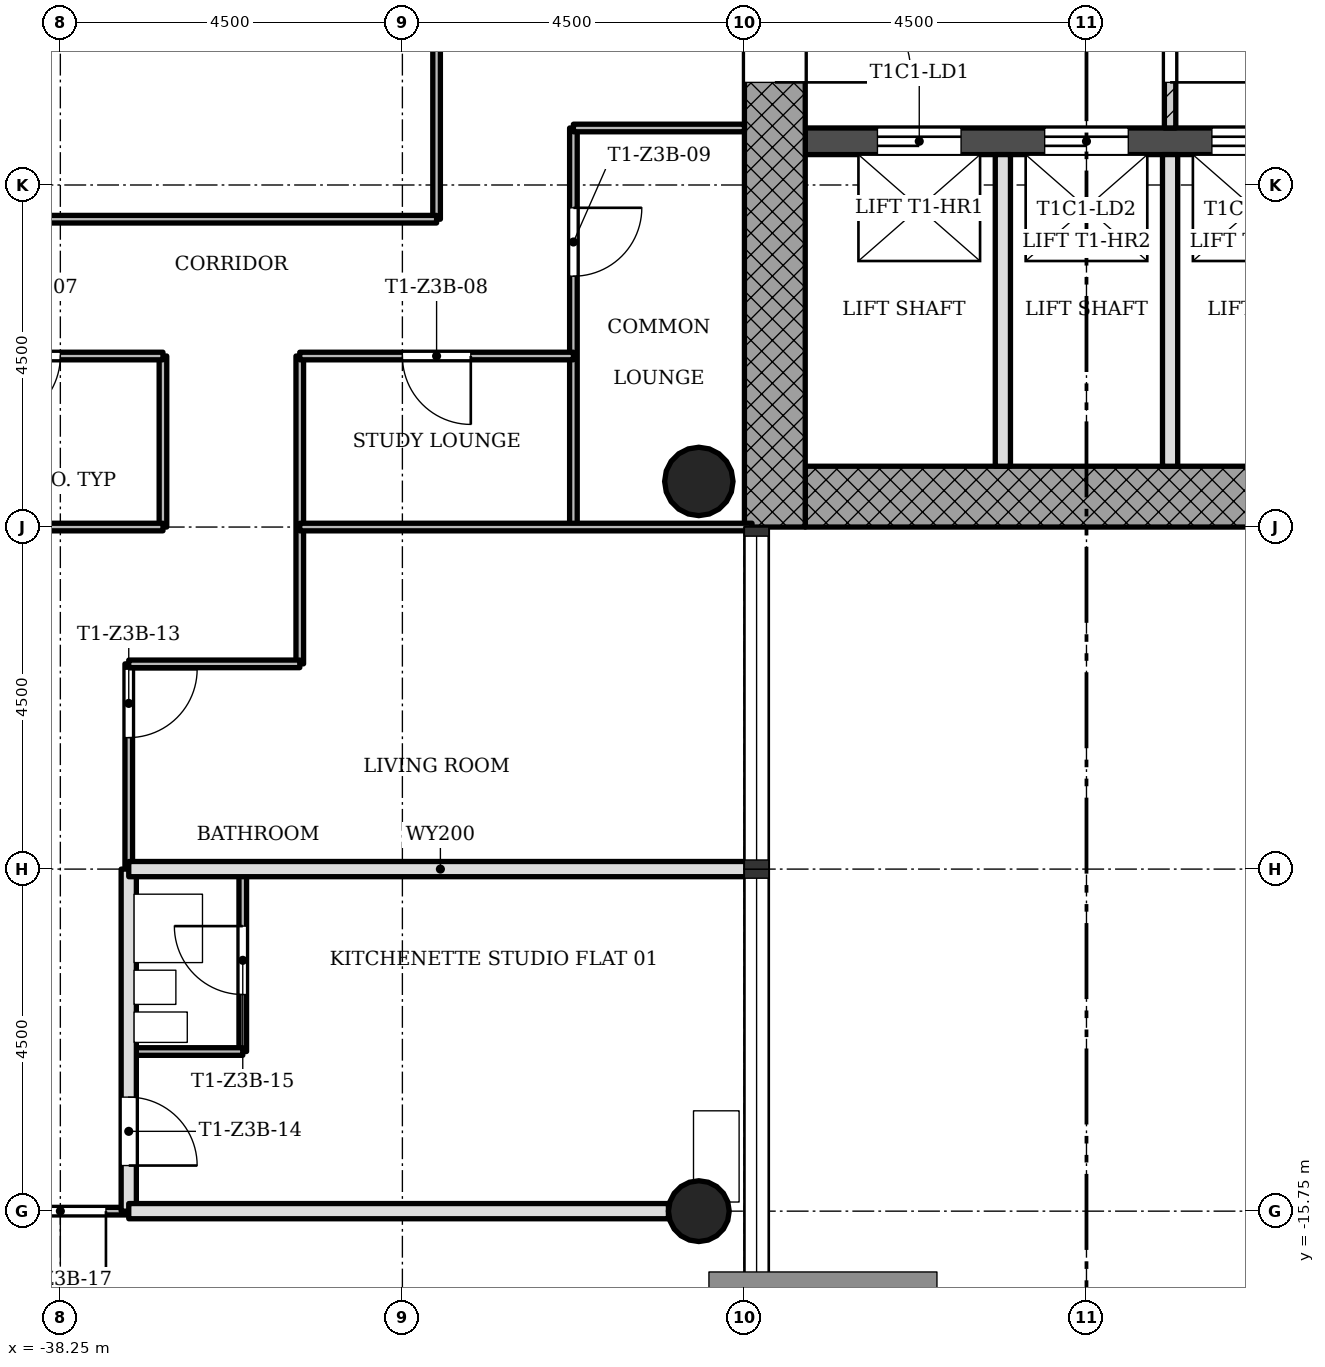
"""IFC4 building model, lengths in metres.
Left out: names, types, materials, properties, quantities, classifications, styles, units other than length and angle.
Written with IfcOpenShell. Run it as: python <this file> out.ifc"""

import sys

from ifc_helpers import new_model, si_unit, direction, frame, frame_2d, origin, origin_2d, place, context, subcontext, project, spatial, rectangle, hollow_circle, extrude, element, fill, save


model = new_model("IFC4")
c1 = context("Model", 3, precision=1e-05, world=origin(), true_north=direction((0.0, 1.0)))
c2 = subcontext(c1, "Body", "Model", "MODEL_VIEW")
j1 = project(units=[si_unit("LENGTHUNIT", "METRE"), si_unit("PLANEANGLEUNIT", "RADIAN")], contexts=[c1])
p1 = place(None, origin())
s1 = spatial("IfcSite", under=j1, at=p1, CompositionType="ELEMENT")
p2 = place(p1, origin())
s2 = spatial("IfcBuilding", under=s1, at=p2, CompositionType="ELEMENT")
p3 = place(p2, frame((0.0, 0.0, 150.7)))
s3 = spatial("IfcBuildingStorey", under=s2, at=p3, CompositionType="ELEMENT", Elevation=150.7)
p4 = place(p3, frame((-28.45, -6.35, 0.0), z_axis=(0.0, 0.0, 1.0), x_axis=(1.0, 0.0, 0.0)))
e1 = element("IfcWall", 1, at=p4, inside=s3, PredefinedType="SHEAR", context=c2, shape_type="SweptSolid", body=[
    extrude(rectangle(XDim=8.2, YDim=0.8, at=frame_2d((4.1, 0.0))), origin(), (0.0, 0.0, 1.0), 3.4),
])
p5 = place(p3, frame((-28.85, 5.95, 0.0), z_axis=(0.0, 0.0, 1.0), x_axis=(0.0, -1.0, 0.0)))
e2 = element("IfcWall", 2, at=p5, inside=s3, PredefinedType="SHEAR", context=c2, shape_type="SweptSolid", body=[
    extrude(rectangle(XDim=12.7, YDim=0.8, at=frame_2d((6.35, 0.0))), origin(), (0.0, 0.0, 1.0), 3.4),
])
p6 = place(p5, frame((5.05, 0.0, 0.0)))
e3 = element("IfcOpeningElement", 3, at=p6, cuts=e2, PredefinedType="OPENING", context=c2, shape_type="SweptSolid", body=[
    extrude(rectangle(XDim=1.8, YDim=2.1, at=frame_2d((0.9, 1.05))), frame((0.0, 0.41, 0.0), z_axis=(0.0, -1.0, 0.0), x_axis=(1.0, 0.0, 0.0)), (0.0, 0.0, 1.0), 0.82),
])
p7 = place(p3, frame((-28.45, -1.675, 0.0), z_axis=(0.0, 0.0, 1.0), x_axis=(1.0, 0.0, 0.0)))
e4 = element("IfcWall", 4, at=p7, inside=s3, PredefinedType="SHEAR", context=c2, shape_type="SweptSolid", body=[
    extrude(rectangle(XDim=7.4, YDim=0.35, at=frame_2d((3.7, 0.0))), origin(), (0.0, 0.0, 1.0), 3.4),
])
p8 = place(p7, frame((0.95, 0.0, 0.0)))
e5 = element("IfcOpeningElement", 5, at=p8, cuts=e4, PredefinedType="OPENING", context=c2, shape_type="SweptSolid", body=[
    extrude(rectangle(XDim=1.1, YDim=2.1, at=frame_2d((0.55, 1.05))), frame((0.0, 0.185, 0.0), z_axis=(0.0, -1.0, 0.0), x_axis=(1.0, 0.0, 0.0)), (0.0, 0.0, 1.0), 0.37),
])
p9 = place(p7, frame((3.15, 0.0, 0.0)))
e6 = element("IfcOpeningElement", 6, at=p9, cuts=e4, PredefinedType="OPENING", context=c2, shape_type="SweptSolid", body=[
    extrude(rectangle(XDim=1.1, YDim=2.1, at=frame_2d((0.55, 1.05))), frame((0.0, 0.185, 0.0), z_axis=(0.0, -1.0, 0.0), x_axis=(1.0, 0.0, 0.0)), (0.0, 0.0, 1.0), 0.37),
])
p10 = place(p7, frame((5.35, 0.0, 0.0)))
e7 = element("IfcOpeningElement", 7, at=p10, cuts=e4, PredefinedType="OPENING", context=c2, shape_type="SweptSolid", body=[
    extrude(rectangle(XDim=1.1, YDim=2.1, at=frame_2d((0.55, 1.05))), frame((0.0, 0.185, 0.0), z_axis=(0.0, -1.0, 0.0), x_axis=(1.0, 0.0, 0.0)), (0.0, 0.0, 1.0), 0.37),
])
p11 = place(p3, frame((-29.85, -15.75, 0.0), z_axis=(0.0, 0.0, 1.0), x_axis=(1.0, 0.0, 0.0)))
e8 = element("IfcColumn", 8, at=p11, inside=s3, PredefinedType="COLUMN", context=c2, shape_type="SweptSolid", body=[
    extrude(hollow_circle(Radius=0.4, WallThickness=0.028, at=origin_2d()), origin(), (0.0, 0.0, 1.0), 3.4),
])
p12 = place(p3, frame((-29.85, -6.15, 0.0), z_axis=(0.0, 0.0, 1.0), x_axis=(1.0, 0.0, 0.0)))
e9 = element("IfcColumn", 9, at=p12, inside=s3, PredefinedType="COLUMN", context=c2, shape_type="SweptSolid", body=[
    extrude(hollow_circle(Radius=0.45, WallThickness=0.032, at=origin_2d()), origin(), (0.0, 0.0, 1.0), 3.4),
])
p13 = place(p3, frame((-23.65, -1.5, 0.0), z_axis=(0.0, 0.0, 1.0), x_axis=(0.0, 1.0, 0.0)))
e10 = element("IfcWall", 10, at=p13, inside=s3, PredefinedType="PARTITIONING", context=c2, shape_type="SweptSolid", body=[
    extrude(rectangle(XDim=3.0, YDim=0.15, at=frame_2d((1.5, 0.0))), origin(), (0.0, 0.0, 1.0), 3.0),
])
p14 = place(p13, frame((0.6, 0.0, 0.0)))
e11 = element("IfcOpeningElement", 11, at=p14, cuts=e10, PredefinedType="OPENING", context=c2, shape_type="SweptSolid", body=[
    extrude(rectangle(XDim=1.8, YDim=2.1, at=frame_2d((0.9, 1.05))), frame((0.0, 0.085, 0.0), z_axis=(0.0, -1.0, 0.0), x_axis=(1.0, 0.0, 0.0)), (0.0, 0.0, 1.0), 0.17),
])
for number, where, z_axis, x_axis in (
    (12, (-25.85, -5.95, 0.0), (0.0, 0.0, 1.0), (0.0, 1.0, 0.0)),
    (13, (-23.65, -5.95, 0.0), (0.0, 0.0, 1.0), (0.0, 1.0, 0.0)),
):
    element("IfcWall", number, at=place(p3, frame(where, z_axis=z_axis, x_axis=x_axis)), inside=s3, PredefinedType="SOLIDWALL", context=c2, shape_type="SweptSolid", body=[
        extrude(rectangle(XDim=4.1, YDim=0.2, at=frame_2d((2.05, 0.0))), origin(), (0.0, 0.0, 1.0), 3.0),
    ])
p15 = place(p3, frame((-37.35, -11.25, 0.0), z_axis=(0.0, 0.0, 1.0), x_axis=(0.0, 1.0, 0.0)))
e14 = element("IfcWall", 14, at=p15, inside=s3, PredefinedType="PARTITIONING", context=c2, shape_type="SweptSolid", body=[
    extrude(rectangle(XDim=2.7, YDim=0.1, at=frame_2d((1.35, 0.0))), origin(), (0.0, 0.0, 1.0), 3.0),
])
p16 = place(p15, frame((1.73, 0.0, 0.0)))
e15 = element("IfcOpeningElement", 15, at=p16, cuts=e14, PredefinedType="OPENING", context=c2, shape_type="SweptSolid", body=[
    extrude(rectangle(XDim=0.9, YDim=2.1, at=frame_2d((0.45, 1.05))), frame((0.0, 0.06, 0.0), z_axis=(0.0, -1.0, 0.0), x_axis=(1.0, 0.0, 0.0)), (0.0, 0.0, 1.0), 0.12),
])
p17 = place(p3, frame((-37.35, -15.75, 0.0), z_axis=(0.0, 0.0, 1.0), x_axis=(0.0, 1.0, 0.0)))
e16 = element("IfcWall", 16, at=p17, inside=s3, PredefinedType="SOLIDWALL", context=c2, shape_type="SweptSolid", body=[
    extrude(rectangle(XDim=4.5, YDim=0.2, at=frame_2d((2.25, 0.0))), origin(), (0.0, 0.0, 1.0), 3.0),
])
p18 = place(p17, frame((0.6, 0.0, 0.0)))
e17 = element("IfcOpeningElement", 17, at=p18, cuts=e16, PredefinedType="OPENING", context=c2, shape_type="SweptSolid", body=[
    extrude(rectangle(XDim=0.9, YDim=2.1, at=frame_2d((0.45, 1.05))), frame((0.0, 0.11, 0.0), z_axis=(0.0, -1.0, 0.0), x_axis=(1.0, 0.0, 0.0)), (0.0, 0.0, 1.0), 0.22),
])
p19 = place(p3, frame((-36.9, -6.75, 0.0), z_axis=(0.0, 0.0, 1.0), x_axis=(0.0, 1.0, 0.0)))
e18 = element("IfcWall", 18, at=p19, inside=s3, PredefinedType="PARTITIONING", context=c2, shape_type="SweptSolid", body=[
    extrude(rectangle(XDim=2.25, YDim=0.1, at=frame_2d((1.125, 0.0))), origin(), (0.0, 0.0, 1.0), 3.0),
])
p20 = place(p3, frame((-35.85, -13.65, 0.0), z_axis=(0.0, 0.0, 1.0), x_axis=(0.0, 1.0, 0.0)))
e19 = element("IfcWall", 19, at=p20, inside=s3, PredefinedType="PARTITIONING", context=c2, shape_type="SweptSolid", body=[
    extrude(rectangle(XDim=2.4, YDim=0.1, at=frame_2d((1.2, 0.0))), origin(), (0.0, 0.0, 1.0), 3.0),
])
p21 = place(p20, frame((0.75, 0.0, 0.0)))
e20 = element("IfcOpeningElement", 20, at=p21, cuts=e19, PredefinedType="OPENING", context=c2, shape_type="SweptSolid", body=[
    extrude(rectangle(XDim=0.9, YDim=2.1, at=frame_2d((0.45, 1.05))), frame((0.0, 0.06, 0.0), z_axis=(0.0, -1.0, 0.0), x_axis=(1.0, 0.0, 0.0)), (0.0, 0.0, 1.0), 0.12),
])
p22 = place(p3, frame((-35.1, -8.55, 0.0), z_axis=(0.0, 0.0, 1.0), x_axis=(0.0, 1.0, 0.0)))
e21 = element("IfcWall", 21, at=p22, inside=s3, PredefinedType="PARTITIONING", context=c2, shape_type="SweptSolid", body=[
    extrude(rectangle(XDim=4.05, YDim=0.1, at=frame_2d((2.025, 0.0))), origin(), (0.0, 0.0, 1.0), 3.0),
])
p23 = place(p3, frame((-33.3, -2.7, 0.0), z_axis=(0.0, 0.0, 1.0), x_axis=(0.0, 1.0, 0.0)))
e22 = element("IfcWall", 22, at=p23, inside=s3, PredefinedType="PARTITIONING", context=c2, shape_type="SweptSolid", body=[
    extrude(rectangle(XDim=5.4, YDim=0.1, at=frame_2d((2.7, 0.0))), origin(), (0.0, 0.0, 1.0), 3.0),
])
p24 = place(p23, frame((2.25, 0.0, 0.0)))
e23 = element("IfcOpeningElement", 23, at=p24, cuts=e22, PredefinedType="OPENING", context=c2, shape_type="SweptSolid", body=[
    extrude(rectangle(XDim=0.9, YDim=2.1, at=frame_2d((0.45, 1.05))), frame((0.0, 0.06, 0.0), z_axis=(0.0, -1.0, 0.0), x_axis=(1.0, 0.0, 0.0)), (0.0, 0.0, 1.0), 0.12),
])
p25 = place(p3, frame((-31.5, -6.75, 0.0), z_axis=(0.0, 0.0, 1.0), x_axis=(0.0, 1.0, 0.0)))
e24 = element("IfcWall", 24, at=p25, inside=s3, PredefinedType="PARTITIONING", context=c2, shape_type="SweptSolid", body=[
    extrude(rectangle(XDim=5.25, YDim=0.1, at=frame_2d((2.625, 0.0))), origin(), (0.0, 0.0, 1.0), 3.0),
])
p26 = place(p25, frame((3.3, 0.0, 0.0)))
e25 = element("IfcOpeningElement", 25, at=p26, cuts=e24, PredefinedType="OPENING", context=c2, shape_type="SweptSolid", body=[
    extrude(rectangle(XDim=0.9, YDim=2.1, at=frame_2d((0.45, 1.05))), frame((0.0, 0.06, 0.0), z_axis=(0.0, -1.0, 0.0), x_axis=(1.0, 0.0, 0.0)), (0.0, 0.0, 1.0), 0.12),
])
p27 = place(p3, frame((-41.75, -15.75, 0.0), z_axis=(0.0, 0.0, 1.0), x_axis=(1.0, 0.0, 0.0)))
e26 = element("IfcWall", 26, at=p27, inside=s3, PredefinedType="PARTITIONING", context=c2, shape_type="SweptSolid", body=[
    extrude(rectangle(XDim=4.4, YDim=0.1, at=frame_2d((2.2, 0.0))), origin(), (0.0, 0.0, 1.0), 3.0),
])
p28 = place(p27, frame((2.9, 0.0, 0.0)))
e27 = element("IfcOpeningElement", 27, at=p28, cuts=e26, PredefinedType="OPENING", context=c2, shape_type="SweptSolid", body=[
    extrude(rectangle(XDim=1.2, YDim=2.1, at=frame_2d((0.6, 1.05))), frame((0.0, 0.06, 0.0), z_axis=(0.0, -1.0, 0.0), x_axis=(1.0, 0.0, 0.0)), (0.0, 0.0, 1.0), 0.12),
])
p29 = place(p3, frame((-37.35, -15.75, 0.0), z_axis=(0.0, 0.0, 1.0), x_axis=(1.0, 0.0, 0.0)))
e28 = element("IfcWall", 28, at=p29, inside=s3, PredefinedType="SOLIDWALL", context=c2, shape_type="SweptSolid", body=[
    extrude(rectangle(XDim=7.1, YDim=0.2, at=frame_2d((3.55, 0.0))), origin(), (0.0, 0.0, 1.0), 3.0),
])
p30 = place(p3, frame((-37.35, -13.65, 0.0), z_axis=(0.0, 0.0, 1.0), x_axis=(1.0, 0.0, 0.0)))
e29 = element("IfcWall", 29, at=p30, inside=s3, PredefinedType="PARTITIONING", context=c2, shape_type="SweptSolid", body=[
    extrude(rectangle(XDim=1.5, YDim=0.1, at=frame_2d((0.75, 0.0))), origin(), (0.0, 0.0, 1.0), 3.0),
])
p31 = place(p3, frame((-37.35, -11.25, 0.0), z_axis=(0.0, 0.0, 1.0), x_axis=(1.0, 0.0, 0.0)))
e30 = element("IfcWall", 30, at=p31, inside=s3, PredefinedType="SOLIDWALL", context=c2, shape_type="SweptSolid", body=[
    extrude(rectangle(XDim=8.2, YDim=0.2, at=frame_2d((4.1, 0.0))), origin(), (0.0, 0.0, 1.0), 3.0),
])
p32 = place(p3, frame((-37.35, -8.55, 0.0), z_axis=(0.0, 0.0, 1.0), x_axis=(1.0, 0.0, 0.0)))
e31 = element("IfcWall", 31, at=p32, inside=s3, PredefinedType="PARTITIONING", context=c2, shape_type="SweptSolid", body=[
    extrude(rectangle(XDim=2.25, YDim=0.1, at=frame_2d((1.125, 0.0))), origin(), (0.0, 0.0, 1.0), 3.0),
])
for number, where, z_axis, x_axis in (
    (32, (-42.85, -6.75, 0.0), (0.0, 0.0, 1.0), (1.0, 0.0, 0.0)),
    (33, (-35.1, -6.75, 0.0), (0.0, 0.0, 1.0), (1.0, 0.0, 0.0)),
):
    element("IfcWall", number, at=place(p3, frame(where, z_axis=z_axis, x_axis=x_axis)), inside=s3, PredefinedType="PARTITIONING", context=c2, shape_type="SweptSolid", body=[
        extrude(rectangle(XDim=5.95, YDim=0.1, at=frame_2d((2.975, 0.0))), origin(), (0.0, 0.0, 1.0), 3.0),
    ])
p33 = place(p3, frame((-40.5, -4.5, 0.0), z_axis=(0.0, 0.0, 1.0), x_axis=(1.0, 0.0, 0.0)))
e34 = element("IfcWall", 34, at=p33, inside=s3, PredefinedType="PARTITIONING", context=c2, shape_type="SweptSolid", body=[
    extrude(rectangle(XDim=3.6, YDim=0.1, at=frame_2d((1.8, 0.0))), origin(), (0.0, 0.0, 1.0), 3.0),
])
p34 = place(p33, frame((1.35, 0.0, 0.0)))
e35 = element("IfcOpeningElement", 35, at=p34, cuts=e34, PredefinedType="OPENING", context=c2, shape_type="SweptSolid", body=[
    extrude(rectangle(XDim=0.9, YDim=2.1, at=frame_2d((0.45, 1.05))), frame((0.0, 0.06, 0.0), z_axis=(0.0, -1.0, 0.0), x_axis=(1.0, 0.0, 0.0)), (0.0, 0.0, 1.0), 0.12),
])
p35 = place(p3, frame((-35.1, -4.5, 0.0), z_axis=(0.0, 0.0, 1.0), x_axis=(1.0, 0.0, 0.0)))
e36 = element("IfcWall", 36, at=p35, inside=s3, PredefinedType="PARTITIONING", context=c2, shape_type="SweptSolid", body=[
    extrude(rectangle(XDim=3.6, YDim=0.1, at=frame_2d((1.8, 0.0))), origin(), (0.0, 0.0, 1.0), 3.0),
])
p36 = place(p35, frame((1.35, 0.0, 0.0)))
e37 = element("IfcOpeningElement", 37, at=p36, cuts=e36, PredefinedType="OPENING", context=c2, shape_type="SweptSolid", body=[
    extrude(rectangle(XDim=0.9, YDim=2.1, at=frame_2d((0.45, 1.05))), frame((0.0, 0.06, 0.0), z_axis=(0.0, -1.0, 0.0), x_axis=(1.0, 0.0, 0.0)), (0.0, 0.0, 1.0), 0.12),
])
p37 = place(p3, frame((-38.7, -2.7, 0.0), z_axis=(0.0, 0.0, 1.0), x_axis=(1.0, 0.0, 0.0)))
e38 = element("IfcWall", 38, at=p37, inside=s3, PredefinedType="PARTITIONING", context=c2, shape_type="SweptSolid", body=[
    extrude(rectangle(XDim=5.4, YDim=0.1, at=frame_2d((2.7, 0.0))), origin(), (0.0, 0.0, 1.0), 3.0),
])
p38 = place(p3, frame((-31.5, -1.5, 0.0), z_axis=(0.0, 0.0, 1.0), x_axis=(1.0, 0.0, 0.0)))
e39 = element("IfcWall", 39, at=p38, inside=s3, PredefinedType="PARTITIONING", context=c2, shape_type="SweptSolid", body=[
    extrude(rectangle(XDim=2.25, YDim=0.1, at=frame_2d((1.125, 0.0))), origin(), (0.0, 0.0, 1.0), 3.0),
])
p39 = place(p14, origin())
e40 = element("IfcDoor", 40, at=p39, inside=s3, OperationType="SINGLE_SWING_LEFT", PredefinedType="DOOR", context=c2, shape_type="SweptSolid", body=[
    extrude(rectangle(XDim=1.8, YDim=2.1, at=frame_2d((0.9, 1.05))), frame((0.0, 0.025, 0.0), z_axis=(0.0, -1.0, 0.0), x_axis=(1.0, 0.0, 0.0)), (0.0, 0.0, 1.0), 0.05),
])
fill(e11, e40)
p40 = place(p34, origin())
e41 = element("IfcDoor", 41, at=p40, inside=s3, OperationType="SINGLE_SWING_LEFT", PredefinedType="DOOR", context=c2, shape_type="SweptSolid", body=[
    extrude(rectangle(XDim=0.9, YDim=2.1, at=frame_2d((0.45, 1.05))), frame((0.0, 0.025, 0.0), z_axis=(0.0, -1.0, 0.0), x_axis=(1.0, 0.0, 0.0)), (0.0, 0.0, 1.0), 0.05),
])
fill(e35, e41)
p41 = place(p36, origin())
e42 = element("IfcDoor", 42, at=p41, inside=s3, OperationType="SINGLE_SWING_RIGHT", PredefinedType="DOOR", context=c2, shape_type="SweptSolid", body=[
    extrude(rectangle(XDim=0.9, YDim=2.1, at=frame_2d((0.45, 1.05))), frame((0.0, 0.025, 0.0), z_axis=(0.0, -1.0, 0.0), x_axis=(1.0, 0.0, 0.0)), (0.0, 0.0, 1.0), 0.05),
])
fill(e37, e42)
p42 = place(p26, origin())
e43 = element("IfcDoor", 43, at=p42, inside=s3, OperationType="SINGLE_SWING_RIGHT", PredefinedType="DOOR", context=c2, shape_type="SweptSolid", body=[
    extrude(rectangle(XDim=0.9, YDim=2.1, at=frame_2d((0.45, 1.05))), frame((0.0, 0.025, 0.0), z_axis=(0.0, -1.0, 0.0), x_axis=(1.0, 0.0, 0.0)), (0.0, 0.0, 1.0), 0.05),
])
fill(e25, e43)
p43 = place(p16, origin())
e44 = element("IfcDoor", 44, at=p43, inside=s3, OperationType="SINGLE_SWING_RIGHT", PredefinedType="DOOR", context=c2, shape_type="SweptSolid", body=[
    extrude(rectangle(XDim=0.9, YDim=2.1, at=frame_2d((0.45, 1.05))), frame((0.0, 0.025, 0.0), z_axis=(0.0, -1.0, 0.0), x_axis=(1.0, 0.0, 0.0)), (0.0, 0.0, 1.0), 0.05),
])
fill(e15, e44)
p44 = place(p18, origin())
e45 = element("IfcDoor", 45, at=p44, inside=s3, OperationType="SINGLE_SWING_LEFT", PredefinedType="DOOR", context=c2, shape_type="SweptSolid", body=[
    extrude(rectangle(XDim=0.9, YDim=2.1, at=frame_2d((0.45, 1.05))), frame((0.0, 0.025, 0.0), z_axis=(0.0, -1.0, 0.0), x_axis=(1.0, 0.0, 0.0)), (0.0, 0.0, 1.0), 0.05),
])
fill(e17, e45)
p45 = place(p21, origin())
e46 = element("IfcDoor", 46, at=p45, inside=s3, OperationType="SINGLE_SWING_LEFT", PredefinedType="DOOR", context=c2, shape_type="SweptSolid", body=[
    extrude(rectangle(XDim=0.9, YDim=2.1, at=frame_2d((0.45, 1.05))), frame((0.0, 0.025, 0.0), z_axis=(0.0, -1.0, 0.0), x_axis=(1.0, 0.0, 0.0)), (0.0, 0.0, 1.0), 0.05),
])
fill(e20, e46)
p46 = place(p28, origin())
e47 = element("IfcDoor", 47, at=p46, inside=s3, OperationType="SINGLE_SWING_RIGHT", PredefinedType="DOOR", context=c2, shape_type="SweptSolid", body=[
    extrude(rectangle(XDim=1.2, YDim=2.1, at=frame_2d((0.6, 1.05))), frame((0.0, 0.025, 0.0), z_axis=(0.0, -1.0, 0.0), x_axis=(1.0, 0.0, 0.0)), (0.0, 0.0, 1.0), 0.05),
])
fill(e27, e47)
p47 = place(p8, origin())
e48 = element("IfcDoor", 48, at=p47, inside=s3, OperationType="SLIDING_TO_LEFT", PredefinedType="DOOR", context=c2, shape_type="SweptSolid", body=[
    extrude(rectangle(XDim=1.1, YDim=2.1, at=frame_2d((0.55, 1.05))), frame((0.0, 0.025, 0.0), z_axis=(0.0, -1.0, 0.0), x_axis=(1.0, 0.0, 0.0)), (0.0, 0.0, 1.0), 0.05),
])
fill(e5, e48)
p48 = place(p9, origin())
e49 = element("IfcDoor", 49, at=p48, inside=s3, OperationType="SLIDING_TO_LEFT", PredefinedType="DOOR", context=c2, shape_type="SweptSolid", body=[
    extrude(rectangle(XDim=1.1, YDim=2.1, at=frame_2d((0.55, 1.05))), frame((0.0, 0.025, 0.0), z_axis=(0.0, -1.0, 0.0), x_axis=(1.0, 0.0, 0.0)), (0.0, 0.0, 1.0), 0.05),
])
fill(e6, e49)
p49 = place(p10, origin())
e50 = element("IfcDoor", 50, at=p49, inside=s3, OperationType="SLIDING_TO_LEFT", PredefinedType="DOOR", context=c2, shape_type="SweptSolid", body=[
    extrude(rectangle(XDim=1.1, YDim=2.1, at=frame_2d((0.55, 1.05))), frame((0.0, 0.025, 0.0), z_axis=(0.0, -1.0, 0.0), x_axis=(1.0, 0.0, 0.0)), (0.0, 0.0, 1.0), 0.05),
])
fill(e7, e50)
p50 = place(p6, origin())
e51 = element("IfcDoor", 51, at=p50, inside=s3, OperationType="SINGLE_SWING_LEFT", PredefinedType="DOOR", context=c2, shape_type="SweptSolid", body=[
    extrude(rectangle(XDim=1.8, YDim=2.1, at=frame_2d((0.9, 1.05))), frame((0.0, 0.025, 0.0), z_axis=(0.0, -1.0, 0.0), x_axis=(1.0, 0.0, 0.0)), (0.0, 0.0, 1.0), 0.05),
])
fill(e3, e51)
save(model, sys.argv[1])
